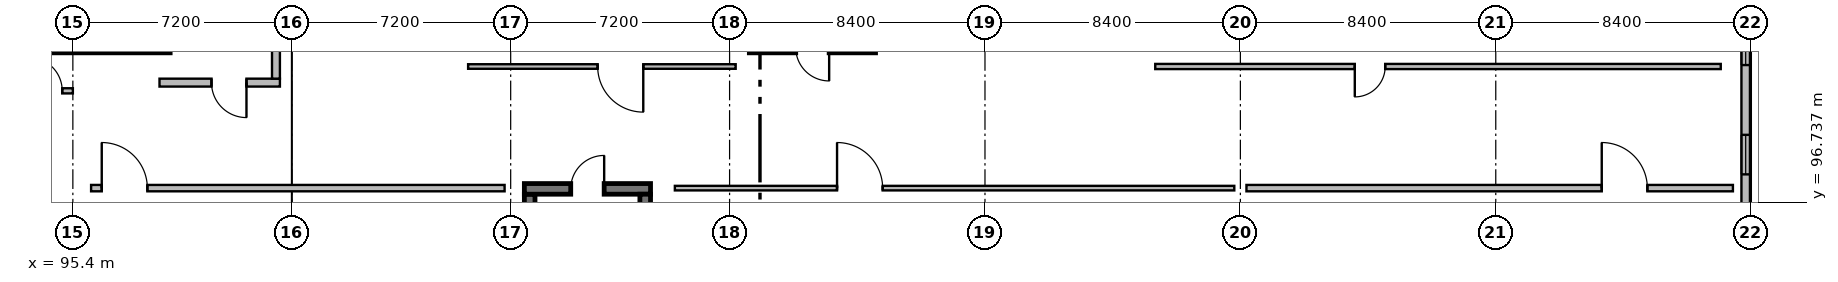
"""IFC4 building model, lengths in metres.
Left out: names, types, materials, properties, quantities, classifications, styles, units other than length and angle.
Written with IfcOpenShell. Run it as: python <this file> out.ifc"""

import sys

from ifc_helpers import new_model, si_unit, direction, frame, frame_2d, origin, place, context, subcontext, project, spatial, rectangle, extrude, element, fill, save


model = new_model("IFC4")
c1 = context("Model", 3, precision=1e-05, world=origin(), true_north=direction((0.0, 1.0)))
c2 = subcontext(c1, "Body", "Model", "MODEL_VIEW")
j1 = project(units=[si_unit("LENGTHUNIT", "METRE"), si_unit("PLANEANGLEUNIT", "RADIAN")], contexts=[c1])
p1 = place(None, origin())
s1 = spatial("IfcSite", under=j1, at=p1, CompositionType="ELEMENT")
p2 = place(p1, origin())
s2 = spatial("IfcBuilding", under=s1, at=p2, CompositionType="ELEMENT")
p3 = place(p2, frame((0.0, 0.0, 9.0)))
s3 = spatial("IfcBuildingStorey", under=s2, at=p3, CompositionType="ELEMENT", Elevation=9.0)
p4 = place(p3, frame((98.6, 101.825, 0.0), z_axis=(0.0, 0.0, 1.0), x_axis=(-1.0, 0.0, 0.0)))
e1 = element("IfcWall", 1, at=p4, inside=s3, PredefinedType="SOLIDWALL", context=c2, shape_type="SweptSolid", body=[
    extrude(rectangle(XDim=4.15, YDim=0.35, at=frame_2d((2.075, 0.0))), origin(), (0.0, 0.0, 1.0), 4.2),
])
p5 = place(p3, frame((102.21, 100.67, 0.0), z_axis=(0.0, 0.0, 1.0), x_axis=(-1.0, 0.0, 0.0)))
e2 = element("IfcWall", 2, at=p5, inside=s3, PredefinedType="SOLIDWALL", context=c2, shape_type="SweptSolid", body=[
    extrude(rectangle(XDim=3.96, YDim=0.26, at=frame_2d((1.98, 0.0))), origin(), (0.0, 0.0, 1.0), 3.95),
])
p6 = place(p5, frame((1.1, 0.0, 0.0)))
e3 = element("IfcOpeningElement", 3, at=p6, cuts=e2, PredefinedType="OPENING", context=c2, shape_type="SweptSolid", body=[
    extrude(rectangle(XDim=1.15, YDim=2.2, at=frame_2d((0.575, 1.1))), frame((0.0, 0.15, 0.0), z_axis=(0.0, -1.0, 0.0), x_axis=(1.0, 0.0, 0.0)), (0.0, 0.0, 1.0), 0.3),
])
p7 = place(p3, frame((102.08, 106.65, 0.0), z_axis=(0.0, 0.0, 1.0), x_axis=(0.0, -1.0, 0.0)))
e4 = element("IfcWall", 4, at=p7, inside=s3, PredefinedType="SOLIDWALL", context=c2, shape_type="SweptSolid", body=[
    extrude(rectangle(XDim=5.85, YDim=0.26, at=frame_2d((2.925, 0.0))), origin(), (0.0, 0.0, 1.0), 3.95),
])
p8 = place(p3, frame((121.8, 101.825, 0.0), z_axis=(0.0, 0.0, 1.0), x_axis=(-1.0, 0.0, 0.0)))
e5 = element("IfcWall", 5, at=p8, inside=s3, PredefinedType="SOLIDWALL", context=c2, shape_type="SweptSolid", body=[
    extrude(rectangle(XDim=4.15, YDim=0.35, at=frame_2d((2.075, 0.0))), origin(), (0.0, 0.0, 1.0), 4.2),
])
p9 = place(p8, frame((1.525, 0.0, 0.0)))
e6 = element("IfcOpeningElement", 6, at=p9, cuts=e5, PredefinedType="OPENING", context=c2, shape_type="SweptSolid", body=[
    extrude(rectangle(XDim=1.1, YDim=2.15, at=frame_2d((0.55, 1.075))), frame((0.0, 0.195, 0.0), z_axis=(0.0, -1.0, 0.0), x_axis=(1.0, 0.0, 0.0)), (0.0, 0.0, 1.0), 0.39),
])
p10 = place(p3, frame((110.425, 89.2, 0.0), z_axis=(0.0, 0.0, 1.0), x_axis=(0.0, 1.0, 0.0)))
e7 = element("IfcWall", 7, at=p10, inside=s3, PredefinedType="SOLIDWALL", context=c2, shape_type="SweptSolid", body=[
    extrude(rectangle(XDim=7.8, YDim=0.35, at=frame_2d((3.9, 0.0))), origin(), (0.0, 0.0, 1.0), 4.2),
])
p11 = place(p3, frame((110.25, 97.175, 0.0), z_axis=(0.0, 0.0, 1.0), x_axis=(1.0, 0.0, 0.0)))
e8 = element("IfcWall", 8, at=p11, inside=s3, PredefinedType="SOLIDWALL", context=c2, shape_type="SweptSolid", body=[
    extrude(rectangle(XDim=4.15, YDim=0.35, at=frame_2d((2.075, 0.0))), origin(), (0.0, 0.0, 1.0), 4.2),
])
p12 = place(p11, frame((1.525, 0.0, 0.0)))
e9 = element("IfcOpeningElement", 9, at=p12, cuts=e8, PredefinedType="OPENING", context=c2, shape_type="SweptSolid", body=[
    extrude(rectangle(XDim=1.1, YDim=2.15, at=frame_2d((0.55, 1.075))), frame((0.0, 0.195, 0.0), z_axis=(0.0, -1.0, 0.0), x_axis=(1.0, 0.0, 0.0)), (0.0, 0.0, 1.0), 0.39),
])
p13 = place(p3, frame((114.225, 97.0, 0.0), z_axis=(0.0, 0.0, 1.0), x_axis=(0.0, -1.0, 0.0)))
e10 = element("IfcWall", 10, at=p13, inside=s3, PredefinedType="SOLIDWALL", context=c2, shape_type="SweptSolid", body=[
    extrude(rectangle(XDim=7.8, YDim=0.35, at=frame_2d((3.9, 0.0))), origin(), (0.0, 0.0, 1.0), 4.2),
])
p14 = place(p3, frame((150.42, 96.505, 0.0), z_axis=(0.0, 0.0, 1.0), x_axis=(0.0, 1.0, 0.0)))
e11 = element("IfcWall", 11, at=p14, inside=s3, PredefinedType="SOLIDWALL", context=c2, shape_type="SweptSolid", body=[
    extrude(rectangle(XDim=7.19, YDim=0.28, at=frame_2d((3.595, 0.0))), origin(), (0.0, 0.0, 1.0), 3.673),
])
p15 = place(p14, frame((1.147, 0.0, 0.95)))
e12 = element("IfcOpeningElement", 12, at=p15, cuts=e11, PredefinedType="OPENING", context=c2, shape_type="SweptSolid", body=[
    extrude(rectangle(XDim=1.3, YDim=1.65, at=frame_2d((0.65, 0.825))), frame((0.0, 0.16, 0.0), z_axis=(0.0, -1.0, 0.0), x_axis=(1.0, 0.0, 0.0)), (0.0, 0.0, 1.0), 0.32),
])
p16 = place(p14, frame((4.742, 0.0, 0.95)))
e13 = element("IfcOpeningElement", 13, at=p16, cuts=e11, PredefinedType="OPENING", context=c2, shape_type="SweptSolid", body=[
    extrude(rectangle(XDim=1.3, YDim=1.65, at=frame_2d((0.65, 0.825))), frame((0.0, 0.16, 0.0), z_axis=(0.0, -1.0, 0.0), x_axis=(1.0, 0.0, 0.0)), (0.0, 0.0, 1.0), 0.32),
])
p17 = place(p3, frame((96.0, 97.2, 0.0), z_axis=(0.0, 0.0, 1.0), x_axis=(1.0, 0.0, 0.0)))
e14 = element("IfcWall", 14, at=p17, inside=s3, PredefinedType="PARTITIONING", context=c2, shape_type="SweptSolid", body=[
    extrude(rectangle(XDim=13.6, YDim=0.21, at=frame_2d((6.8, 0.0))), origin(), (0.0, 0.0, 1.0), 3.95),
])
p18 = place(p17, frame((0.35, 0.0, 0.0)))
e15 = element("IfcOpeningElement", 15, at=p18, cuts=e14, PredefinedType="OPENING", context=c2, shape_type="SweptSolid", body=[
    extrude(rectangle(XDim=1.5, YDim=2.25, at=frame_2d((0.75, 1.125))), frame((0.0, 0.125, 0.0), z_axis=(0.0, -1.0, 0.0), x_axis=(1.0, 0.0, 0.0)), (0.0, 0.0, 1.0), 0.25),
])
p19 = place(p3, frame((115.2, 97.2, 0.0), z_axis=(0.0, 0.0, 1.0), x_axis=(1.0, 0.0, 0.0)))
e16 = element("IfcWall", 16, at=p19, inside=s3, PredefinedType="PARTITIONING", context=c2, shape_type="SweptSolid", body=[
    extrude(rectangle(XDim=18.4, YDim=0.15, at=frame_2d((9.2, 0.0))), origin(), (0.0, 0.0, 1.0), 3.93),
])
p20 = place(p19, frame((5.335, 0.0, 0.0)))
e17 = element("IfcOpeningElement", 17, at=p20, cuts=e16, PredefinedType="OPENING", context=c2, shape_type="SweptSolid", body=[
    extrude(rectangle(XDim=1.5, YDim=2.25, at=frame_2d((0.75, 1.125))), frame((0.0, 0.095, 0.0), z_axis=(0.0, -1.0, 0.0), x_axis=(1.0, 0.0, 0.0)), (0.0, 0.0, 1.0), 0.19),
])
p21 = place(p3, frame((117.2, 101.2, 0.0), z_axis=(0.0, 0.0, 1.0), x_axis=(-1.0, 0.0, 0.0)))
e18 = element("IfcWall", 18, at=p21, inside=s3, PredefinedType="PARTITIONING", context=c2, shape_type="SweptSolid", body=[
    extrude(rectangle(XDim=8.8, YDim=0.15, at=frame_2d((4.4, 0.0))), origin(), (0.0, 0.0, 1.0), 3.93),
])
p22 = place(p21, frame((3.039, 0.0, 0.0)))
e19 = element("IfcOpeningElement", 19, at=p22, cuts=e18, PredefinedType="OPENING", context=c2, shape_type="SweptSolid", body=[
    extrude(rectangle(XDim=1.5, YDim=2.25, at=frame_2d((0.75, 1.125))), frame((0.0, 0.095, 0.0), z_axis=(0.0, -1.0, 0.0), x_axis=(1.0, 0.0, 0.0)), (0.0, 0.0, 1.0), 0.19),
])
p23 = place(p3, frame((149.6, 101.2, 0.0), z_axis=(0.0, 0.0, 1.0), x_axis=(-1.0, 0.0, 0.0)))
e20 = element("IfcWall", 20, at=p23, inside=s3, PredefinedType="PARTITIONING", context=c2, shape_type="SweptSolid", body=[
    extrude(rectangle(XDim=18.6, YDim=0.17, at=frame_2d((9.3, 0.0))), origin(), (0.0, 0.0, 1.0), 3.93),
])
p24 = place(p23, frame((11.037, 0.0, 0.0)))
e21 = element("IfcOpeningElement", 21, at=p24, cuts=e20, PredefinedType="OPENING", context=c2, shape_type="SweptSolid", body=[
    extrude(rectangle(XDim=1.0, YDim=2.2, at=frame_2d((0.5, 1.1))), frame((0.0, 0.105, 0.0), z_axis=(0.0, -1.0, 0.0), x_axis=(1.0, 0.0, 0.0)), (0.0, 0.0, 1.0), 0.21),
])
p25 = place(p3, frame((90.2, 100.4, 0.0), z_axis=(0.0, 0.0, 1.0), x_axis=(1.0, 0.0, 0.0)))
e22 = element("IfcWall", 22, at=p25, inside=s3, PredefinedType="PARTITIONING", context=c2, shape_type="SweptSolid", body=[
    extrude(rectangle(XDim=5.2, YDim=0.17, at=frame_2d((2.6, 0.0))), origin(), (0.0, 0.0, 1.0), 3.95),
])
p26 = place(p25, frame((3.75, 0.0, 0.0)))
e23 = element("IfcOpeningElement", 23, at=p26, cuts=e22, PredefinedType="OPENING", context=c2, shape_type="SweptSolid", body=[
    extrude(rectangle(XDim=1.1, YDim=2.1, at=frame_2d((0.55, 1.05))), frame((0.0, 0.105, 0.0), z_axis=(0.0, -1.0, 0.0), x_axis=(1.0, 0.0, 0.0)), (0.0, 0.0, 1.0), 0.21),
])
p27 = place(p3, frame((134.0, 97.2, 0.0), z_axis=(0.0, 0.0, 1.0), x_axis=(1.0, 0.0, 0.0)))
e24 = element("IfcWall", 24, at=p27, inside=s3, PredefinedType="PARTITIONING", context=c2, shape_type="SweptSolid", body=[
    extrude(rectangle(XDim=16.0, YDim=0.21, at=frame_2d((8.0, 0.0))), origin(), (0.0, 0.0, 1.0), 3.93),
])
p28 = place(p27, frame((11.686, 0.0, 0.0)))
e25 = element("IfcOpeningElement", 25, at=p28, cuts=e24, PredefinedType="OPENING", context=c2, shape_type="SweptSolid", body=[
    extrude(rectangle(XDim=1.5, YDim=2.25, at=frame_2d((0.75, 1.125))), frame((0.0, 0.125, 0.0), z_axis=(0.0, -1.0, 0.0), x_axis=(1.0, 0.0, 0.0)), (0.0, 0.0, 1.0), 0.25),
])
p29 = place(p6, origin())
e26 = element("IfcDoor", 26, at=p29, inside=s3, OperationType="SINGLE_SWING_LEFT", PredefinedType="DOOR", context=c2, shape_type="SweptSolid", body=[
    extrude(rectangle(XDim=1.15, YDim=2.2, at=frame_2d((0.575, 1.1))), frame((0.0, 0.025, 0.0), z_axis=(0.0, -1.0, 0.0), x_axis=(1.0, 0.0, 0.0)), (0.0, 0.0, 1.0), 0.05),
])
fill(e3, e26)
p30 = place(p12, origin())
e27 = element("IfcDoor", 27, at=p30, inside=s3, OperationType="SINGLE_SWING_RIGHT", PredefinedType="DOOR", context=c2, shape_type="SweptSolid", body=[
    extrude(rectangle(XDim=1.1, YDim=2.15, at=frame_2d((0.55, 1.075))), frame((0.0, 0.025, 0.0), z_axis=(0.0, -1.0, 0.0), x_axis=(1.0, 0.0, 0.0)), (0.0, 0.0, 1.0), 0.05),
])
fill(e9, e27)
p31 = place(p15, origin())
e28 = element("IfcWindow", 28, at=p31, inside=s3, PartitioningType="SINGLE_PANEL", PredefinedType="WINDOW", context=c2, shape_type="SweptSolid", body=[
    extrude(rectangle(XDim=1.3, YDim=1.65, at=frame_2d((0.65, 0.825))), frame((0.0, 0.03, 0.0), z_axis=(0.0, -1.0, 0.0), x_axis=(1.0, 0.0, 0.0)), (0.0, 0.0, 1.0), 0.06),
])
fill(e12, e28)
p32 = place(p16, origin())
e29 = element("IfcWindow", 29, at=p32, inside=s3, PartitioningType="SINGLE_PANEL", PredefinedType="WINDOW", context=c2, shape_type="SweptSolid", body=[
    extrude(rectangle(XDim=1.3, YDim=1.65, at=frame_2d((0.65, 0.825))), frame((0.0, 0.03, 0.0), z_axis=(0.0, -1.0, 0.0), x_axis=(1.0, 0.0, 0.0)), (0.0, 0.0, 1.0), 0.06),
])
fill(e13, e29)
p33 = place(p18, origin())
e30 = element("IfcDoor", 30, at=p33, inside=s3, OperationType="DOUBLE_DOOR_SINGLE_SWING", PredefinedType="DOOR", context=c2, shape_type="SweptSolid", body=[
    extrude(rectangle(XDim=1.5, YDim=2.25, at=frame_2d((0.75, 1.125))), frame((0.0, 0.025, 0.0), z_axis=(0.0, -1.0, 0.0), x_axis=(1.0, 0.0, 0.0)), (0.0, 0.0, 1.0), 0.05),
])
fill(e15, e30)
p34 = place(p20, origin())
e31 = element("IfcDoor", 31, at=p34, inside=s3, OperationType="DOUBLE_DOOR_SINGLE_SWING", PredefinedType="DOOR", context=c2, shape_type="SweptSolid", body=[
    extrude(rectangle(XDim=1.5, YDim=2.25, at=frame_2d((0.75, 1.125))), frame((0.0, 0.025, 0.0), z_axis=(0.0, -1.0, 0.0), x_axis=(1.0, 0.0, 0.0)), (0.0, 0.0, 1.0), 0.05),
])
fill(e17, e31)
p35 = place(p22, origin())
e32 = element("IfcDoor", 32, at=p35, inside=s3, OperationType="DOUBLE_DOOR_SINGLE_SWING", PredefinedType="DOOR", context=c2, shape_type="SweptSolid", body=[
    extrude(rectangle(XDim=1.5, YDim=2.25, at=frame_2d((0.75, 1.125))), frame((0.0, 0.025, 0.0), z_axis=(0.0, -1.0, 0.0), x_axis=(1.0, 0.0, 0.0)), (0.0, 0.0, 1.0), 0.05),
])
fill(e19, e32)
p36 = place(p24, origin())
e33 = element("IfcDoor", 33, at=p36, inside=s3, OperationType="SINGLE_SWING_RIGHT", PredefinedType="DOOR", context=c2, shape_type="SweptSolid", body=[
    extrude(rectangle(XDim=1.0, YDim=2.2, at=frame_2d((0.5, 1.1))), frame((0.0, 0.025, 0.0), z_axis=(0.0, -1.0, 0.0), x_axis=(1.0, 0.0, 0.0)), (0.0, 0.0, 1.0), 0.05),
])
fill(e21, e33)
p37 = place(p26, origin())
e34 = element("IfcDoor", 34, at=p37, inside=s3, OperationType="SINGLE_SWING_LEFT", PredefinedType="DOOR", context=c2, shape_type="SweptSolid", body=[
    extrude(rectangle(XDim=1.1, YDim=2.1, at=frame_2d((0.55, 1.05))), frame((0.0, 0.025, 0.0), z_axis=(0.0, -1.0, 0.0), x_axis=(1.0, 0.0, 0.0)), (0.0, 0.0, 1.0), 0.05),
])
fill(e23, e34)
p38 = place(p28, origin())
e35 = element("IfcDoor", 35, at=p38, inside=s3, OperationType="DOUBLE_DOOR_SINGLE_SWING", PredefinedType="DOOR", context=c2, shape_type="SweptSolid", body=[
    extrude(rectangle(XDim=1.5, YDim=2.25, at=frame_2d((0.75, 1.125))), frame((0.0, 0.025, 0.0), z_axis=(0.0, -1.0, 0.0), x_axis=(1.0, 0.0, 0.0)), (0.0, 0.0, 1.0), 0.05),
])
fill(e25, e35)
save(model, sys.argv[1])
